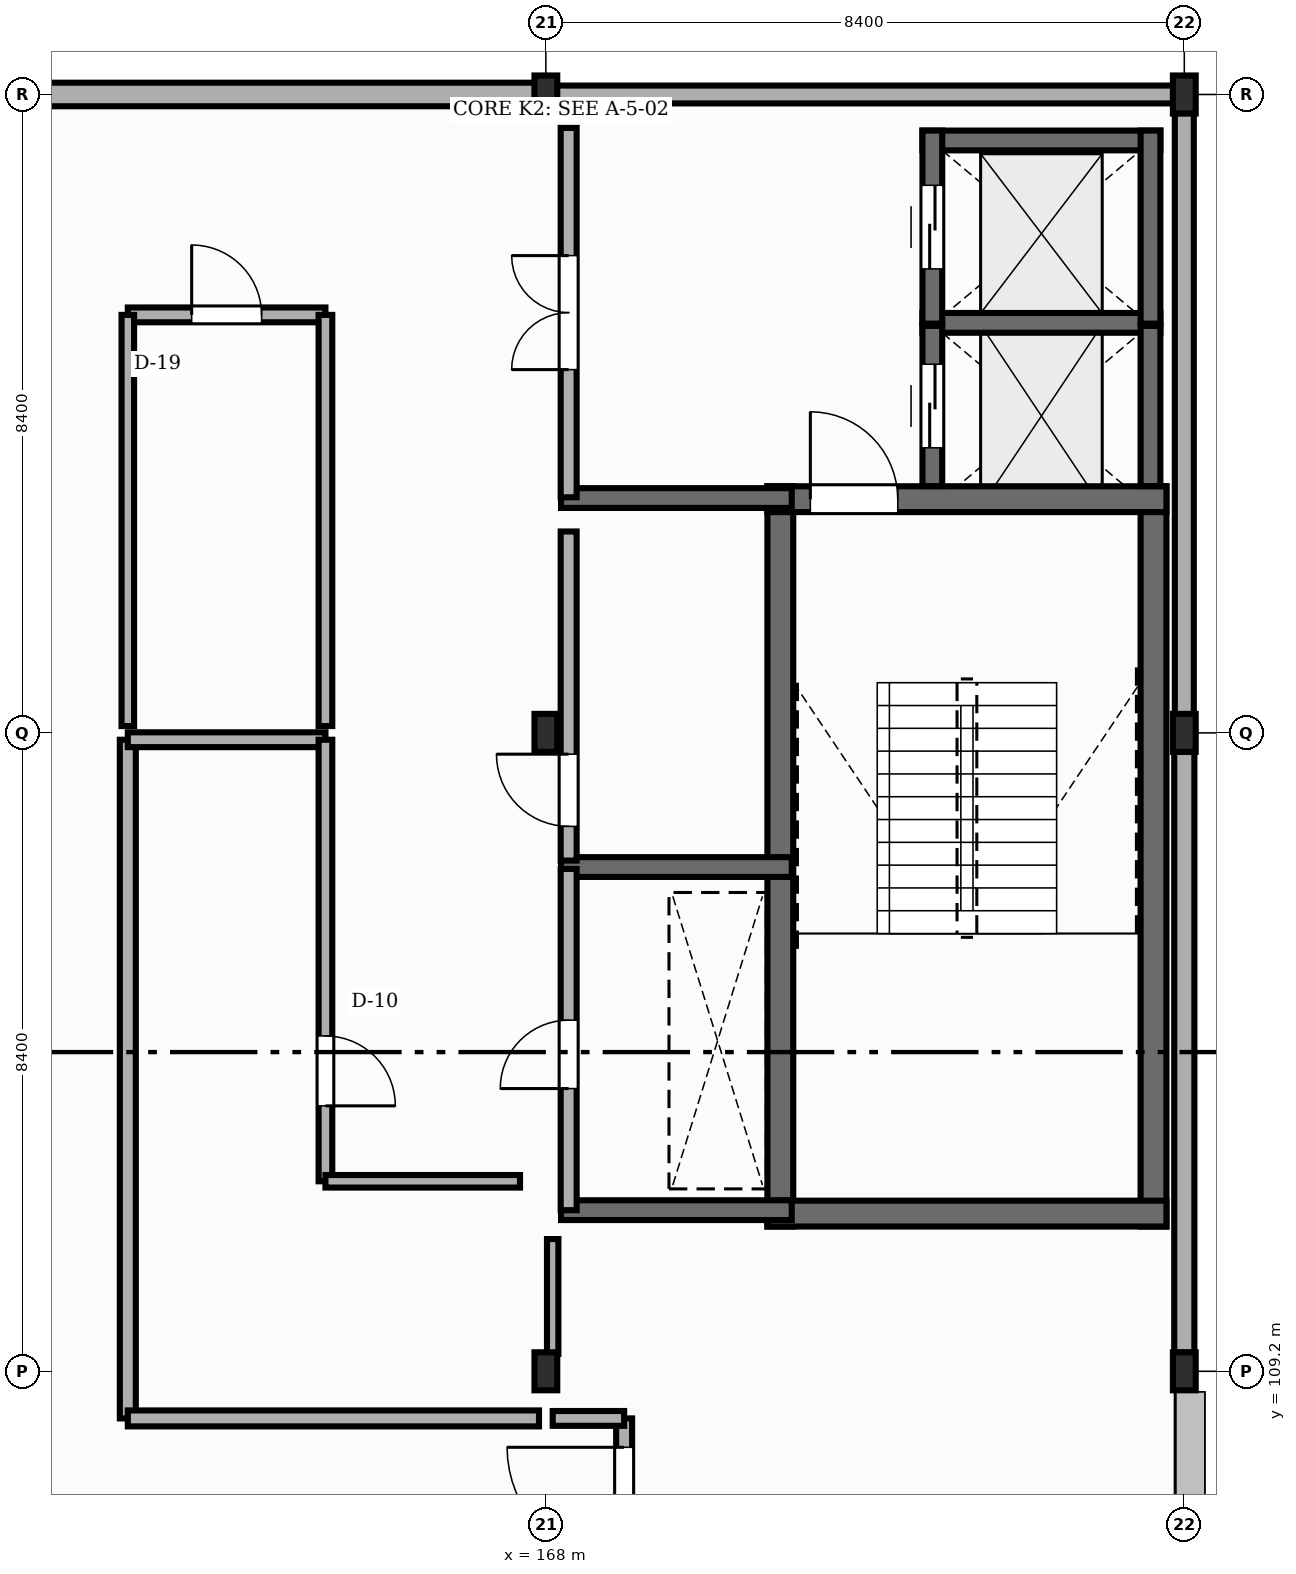
"""IFC4 building model, lengths in metres.
Left out: names, types, materials, properties, quantities, classifications, styles, units other than length and angle.
Written with IfcOpenShell. Run it as: python <this file> out.ifc"""

import sys

from ifc_helpers import new_model, si_unit, direction, frame, frame_2d, origin, origin_2d, place, context, subcontext, project, spatial, rectangle, i_section, extrude, element, fill, save


model = new_model("IFC4")
c1 = context("Model", 3, precision=1e-05, world=origin(), true_north=direction((0.0, 1.0)))
c2 = subcontext(c1, "Body", "Model", "MODEL_VIEW")
j1 = project(units=[si_unit("LENGTHUNIT", "METRE"), si_unit("PLANEANGLEUNIT", "RADIAN")], contexts=[c1])
p1 = place(None, origin())
s1 = spatial("IfcSite", under=j1, at=p1, CompositionType="ELEMENT")
p2 = place(p1, origin())
s2 = spatial("IfcBuilding", under=s1, at=p2, CompositionType="ELEMENT")
p3 = place(p2, frame((0.0, 0.0, 13.95)))
s3 = spatial("IfcBuildingStorey", under=s2, at=p3, CompositionType="ELEMENT", Elevation=13.95)
for number, where, z_axis, x_axis in (
    (1, (168.0, 109.2, 0.0), (0.0, 0.0, 1.0), (1.0, 0.0, 0.0)),
    (2, (168.0, 117.6, 0.0), (0.0, 0.0, 1.0), (1.0, 0.0, 0.0)),
    (3, (168.0, 126.0, 0.0), (0.0, 0.0, 1.0), (1.0, 0.0, 0.0)),
    (4, (176.4, 109.2, 0.0), (0.0, 0.0, 1.0), (1.0, 0.0, 0.0)),
    (5, (176.4, 117.6, 0.0), (0.0, 0.0, 1.0), (1.0, 0.0, 0.0)),
    (6, (176.4, 126.0, 0.0), (0.0, 0.0, 1.0), (1.0, 0.0, 0.0)),
):
    element("IfcColumn", number, at=place(p3, frame(where, z_axis=z_axis, x_axis=x_axis)), inside=s3, PredefinedType="COLUMN", context=c2, shape_type="SweptSolid", body=[
        extrude(i_section(OverallWidth=0.3, OverallDepth=0.5, WebThickness=0.014, FlangeThickness=0.028, FilletRadius=0.027, at=origin_2d()), origin(), (0.0, 0.0, 1.0), 4.05),
    ])
p4 = place(p3, frame((176.4, 109.446, 0.0), z_axis=(0.0, 0.0, 1.0), x_axis=(0.0, 1.0, 0.0)))
e7 = element("IfcWall", 7, at=p4, inside=s3, PredefinedType="STANDARD", context=c2, shape_type="SweptSolid", body=[
    extrude(rectangle(XDim=7.908, YDim=0.265, at=frame_2d((3.954, 0.0))), origin(), (0.0, 0.0, 1.0), 3.487),
])
p5 = place(p3, frame((176.4, 117.846, 0.0), z_axis=(0.0, 0.0, 1.0), x_axis=(0.0, 1.0, 0.0)))
e8 = element("IfcWall", 8, at=p5, inside=s3, PredefinedType="STANDARD", context=c2, shape_type="SweptSolid", body=[
    extrude(rectangle(XDim=7.908, YDim=0.25, at=frame_2d((3.954, 0.0))), origin(), (0.0, 0.0, 1.0), 3.577),
])
p6 = place(p3, frame((176.392, 126.0, 0.0), z_axis=(0.0, 0.0, 1.0), x_axis=(-1.0, 0.0, 0.0)))
e9 = element("IfcWall", 9, at=p6, inside=s3, PredefinedType="STANDARD", context=c2, shape_type="SweptSolid", body=[
    extrude(rectangle(XDim=8.384, YDim=0.235, at=frame_2d((4.192, 0.0))), origin(), (0.0, 0.0, 1.0), 3.517),
])
p7 = place(p3, frame((167.992, 126.0, 0.0), z_axis=(0.0, 0.0, 1.0), x_axis=(-1.0, 0.0, 0.0)))
e10 = element("IfcWall", 10, at=p7, inside=s3, PredefinedType="STANDARD", context=c2, shape_type="SweptSolid", body=[
    extrude(rectangle(XDim=8.384, YDim=0.31, at=frame_2d((4.192, 0.0))), origin(), (0.0, 0.0, 1.0), 3.487),
])
for number, where, z_axis, x_axis in (
    (11, (171.085, 111.105, 0.0), (0.0, 0.0, 1.0), (0.0, 1.0, 0.0)),
    (12, (175.995, 111.105, 0.0), (0.0, 0.0, 1.0), (0.0, 1.0, 0.0)),
):
    element("IfcWall", number, at=place(p3, frame(where, z_axis=z_axis, x_axis=x_axis)), inside=s3, PredefinedType="SHEAR", context=c2, shape_type="SweptSolid", body=[
        extrude(rectangle(XDim=9.74, YDim=0.34, at=frame_2d((4.87, 0.0))), origin(), (0.0, 0.0, 1.0), 3.85),
    ])
p8 = place(p3, frame((170.915, 111.275, 0.0), z_axis=(0.0, 0.0, 1.0), x_axis=(1.0, 0.0, 0.0)))
e13 = element("IfcWall", 13, at=p8, inside=s3, PredefinedType="SHEAR", context=c2, shape_type="SweptSolid", body=[
    extrude(rectangle(XDim=5.25, YDim=0.34, at=frame_2d((2.625, 0.0))), origin(), (0.0, 0.0, 1.0), 3.85),
])
p9 = place(p3, frame((170.915, 120.675, 0.0), z_axis=(0.0, 0.0, 1.0), x_axis=(1.0, 0.0, 0.0)))
e14 = element("IfcWall", 14, at=p9, inside=s3, PredefinedType="SHEAR", context=c2, shape_type="SweptSolid", body=[
    extrude(rectangle(XDim=5.25, YDim=0.34, at=frame_2d((2.625, 0.0))), origin(), (0.0, 0.0, 1.0), 3.85),
])
p10 = place(p9, frame((0.565, 0.0, 0.0)))
e15 = element("IfcOpeningElement", 15, at=p10, cuts=e14, PredefinedType="OPENING", context=c2, shape_type="SweptSolid", body=[
    extrude(rectangle(XDim=1.15, YDim=2.15, at=frame_2d((0.575, 1.075))), frame((0.0, 0.18, 0.0), z_axis=(0.0, -1.0, 0.0), x_axis=(1.0, 0.0, 0.0)), (0.0, 0.0, 1.0), 0.36),
])
p11 = place(p3, frame((172.955, 122.995, 0.0), z_axis=(0.0, 0.0, 1.0), x_axis=(1.0, 0.0, 0.0)))
e16 = element("IfcWall", 16, at=p11, inside=s3, PredefinedType="SHEAR", context=c2, shape_type="SweptSolid", body=[
    extrude(rectangle(XDim=3.13, YDim=0.26, at=frame_2d((1.565, 0.0))), origin(), (0.0, 0.0, 1.0), 3.85),
])
p12 = place(p3, frame((175.955, 120.847, 0.0), z_axis=(0.0, 0.0, 1.0), x_axis=(0.0, 1.0, 0.0)))
e17 = element("IfcWall", 17, at=p12, inside=s3, PredefinedType="SHEAR", context=c2, shape_type="SweptSolid", body=[
    extrude(rectangle(XDim=2.108, YDim=0.26, at=frame_2d((1.054, 0.0))), origin(), (0.0, 0.0, 1.0), 3.85),
])
p13 = place(p3, frame((173.085, 120.847, 0.0), z_axis=(0.0, 0.0, 1.0), x_axis=(0.0, 1.0, 0.0)))
e18 = element("IfcWall", 18, at=p13, inside=s3, PredefinedType="SHEAR", context=c2, shape_type="SweptSolid", body=[
    extrude(rectangle(XDim=2.108, YDim=0.26, at=frame_2d((1.054, 0.0))), origin(), (0.0, 0.0, 1.0), 3.85),
])
p14 = place(p13, frame((0.504, 0.0, 0.0)))
e19 = element("IfcOpeningElement", 19, at=p14, cuts=e18, PredefinedType="OPENING", context=c2, shape_type="SweptSolid", body=[
    extrude(rectangle(XDim=1.1, YDim=2.15, at=frame_2d((0.55, 1.075))), frame((0.0, 0.14, 0.0), z_axis=(0.0, -1.0, 0.0), x_axis=(1.0, 0.0, 0.0)), (0.0, 0.0, 1.0), 0.28),
])
p15 = place(p3, frame((172.955, 125.395, 0.0), z_axis=(0.0, 0.0, 1.0), x_axis=(1.0, 0.0, 0.0)))
e20 = element("IfcWall", 20, at=p15, inside=s3, PredefinedType="SHEAR", context=c2, shape_type="SweptSolid", body=[
    extrude(rectangle(XDim=3.13, YDim=0.26, at=frame_2d((1.565, 0.0))), origin(), (0.0, 0.0, 1.0), 3.85),
])
p16 = place(p3, frame((175.955, 122.985, 0.0), z_axis=(0.0, 0.0, 1.0), x_axis=(0.0, 1.0, 0.0)))
e21 = element("IfcWall", 21, at=p16, inside=s3, PredefinedType="SHEAR", context=c2, shape_type="SweptSolid", body=[
    extrude(rectangle(XDim=2.54, YDim=0.26, at=frame_2d((1.27, 0.0))), origin(), (0.0, 0.0, 1.0), 3.85),
])
p17 = place(p3, frame((173.085, 122.985, 0.0), z_axis=(0.0, 0.0, 1.0), x_axis=(0.0, 1.0, 0.0)))
e22 = element("IfcWall", 22, at=p17, inside=s3, PredefinedType="SHEAR", context=c2, shape_type="SweptSolid", body=[
    extrude(rectangle(XDim=2.54, YDim=0.26, at=frame_2d((1.27, 0.0))), origin(), (0.0, 0.0, 1.0), 3.85),
])
p18 = place(p17, frame((0.72, 0.0, 0.0)))
e23 = element("IfcOpeningElement", 23, at=p18, cuts=e22, PredefinedType="OPENING", context=c2, shape_type="SweptSolid", body=[
    extrude(rectangle(XDim=1.1, YDim=2.15, at=frame_2d((0.55, 1.075))), frame((0.0, 0.14, 0.0), z_axis=(0.0, -1.0, 0.0), x_axis=(1.0, 0.0, 0.0)), (0.0, 0.0, 1.0), 0.28),
])
for number, where, z_axis, x_axis in (
    (24, (168.2, 111.32, 0.0), (0.0, 0.0, 1.0), (1.0, 0.0, 0.0)),
    (25, (168.2, 115.835, 0.0), (0.0, 0.0, 1.0), (1.0, 0.0, 0.0)),
    (26, (168.2, 120.69, 0.0), (0.0, 0.0, 1.0), (1.0, 0.0, 0.0)),
):
    element("IfcWall", number, at=place(p3, frame(where, z_axis=z_axis, x_axis=x_axis)), inside=s3, PredefinedType="SHEAR", context=c2, shape_type="SweptSolid", body=[
        extrude(rectangle(XDim=3.035, YDim=0.26, at=frame_2d((1.518, 0.0))), origin(), (0.0, 0.0, 1.0), 3.85),
    ])
p19 = place(p3, frame((168.3, 111.32, 0.0), z_axis=(0.0, 0.0, 1.0), x_axis=(0.0, 1.0, 0.0)))
e27 = element("IfcWall", 27, at=p19, inside=s3, PredefinedType="STANDARD", context=c2, shape_type="SweptSolid", body=[
    extrude(rectangle(XDim=4.49, YDim=0.21, at=frame_2d((2.245, 0.0))), origin(), (0.0, 0.0, 1.0), 3.497),
])
p20 = place(p19, frame((1.6, 0.0, 0.0)))
e28 = element("IfcOpeningElement", 28, at=p20, cuts=e27, PredefinedType="OPENING", context=c2, shape_type="SweptSolid", body=[
    extrude(rectangle(XDim=0.9, YDim=2.1, at=frame_2d((0.45, 1.05))), frame((0.0, 0.115, 0.0), z_axis=(0.0, -1.0, 0.0), x_axis=(1.0, 0.0, 0.0)), (0.0, 0.0, 1.0), 0.23),
])
p21 = place(p3, frame((168.3, 115.92, 0.0), z_axis=(0.0, 0.0, 1.0), x_axis=(0.0, 1.0, 0.0)))
e29 = element("IfcWall", 29, at=p21, inside=s3, PredefinedType="STANDARD", context=c2, shape_type="SweptSolid", body=[
    extrude(rectangle(XDim=4.33, YDim=0.21, at=frame_2d((2.165, 0.0))), origin(), (0.0, 0.0, 1.0), 3.497),
])
p22 = place(p21, frame((0.45, 0.0, 0.0)))
e30 = element("IfcOpeningElement", 30, at=p22, cuts=e29, PredefinedType="OPENING", context=c2, shape_type="SweptSolid", body=[
    extrude(rectangle(XDim=0.95, YDim=2.15, at=frame_2d((0.475, 1.075))), frame((0.0, 0.115, 0.0), z_axis=(0.0, -1.0, 0.0), x_axis=(1.0, 0.0, 0.0)), (0.0, 0.0, 1.0), 0.23),
])
p23 = place(p3, frame((168.3, 120.7, 0.0), z_axis=(0.0, 0.0, 1.0), x_axis=(0.0, 1.0, 0.0)))
e31 = element("IfcWall", 31, at=p23, inside=s3, PredefinedType="STANDARD", context=c2, shape_type="SweptSolid", body=[
    extrude(rectangle(XDim=4.86, YDim=0.21, at=frame_2d((2.43, 0.0))), origin(), (0.0, 0.0, 1.0), 3.537),
])
p24 = place(p23, frame((1.68, 0.0, 0.0)))
e32 = element("IfcOpeningElement", 32, at=p24, cuts=e31, PredefinedType="OPENING", context=c2, shape_type="SweptSolid", body=[
    extrude(rectangle(XDim=1.5, YDim=2.2, at=frame_2d((0.75, 1.1))), frame((0.0, 0.115, 0.0), z_axis=(0.0, -1.0, 0.0), x_axis=(1.0, 0.0, 0.0)), (0.0, 0.0, 1.0), 0.23),
])
p25 = place(p3, frame((169.03, 106.3, -0.004), z_axis=(0.0, 0.0, 1.0), x_axis=(0.0, 1.0, 0.0)))
e33 = element("IfcWall", 33, at=p25, inside=s3, PredefinedType="STANDARD", context=c2, shape_type="SweptSolid", body=[
    extrude(rectangle(XDim=2.28, YDim=0.21, at=frame_2d((1.14, 0.0))), origin(), (0.0, 0.0, 1.0), 3.854),
])
p26 = place(p25, frame((0.36, 0.0, 0.0)))
e34 = element("IfcOpeningElement", 34, at=p26, cuts=e33, PredefinedType="OPENING", context=c2, shape_type="SweptSolid", body=[
    extrude(rectangle(XDim=1.54, YDim=2.22, at=frame_2d((0.77, 1.11))), frame((0.0, 0.115, 0.0), z_axis=(0.0, -1.0, 0.0), x_axis=(1.0, 0.0, 0.0)), (0.0, 0.0, 1.0), 0.23),
])
p27 = place(p3, frame((169.03, 108.58, -0.004), z_axis=(0.0, 0.0, 1.0), x_axis=(-1.0, 0.0, 0.0)))
e35 = element("IfcWall", 35, at=p27, inside=s3, PredefinedType="STANDARD", context=c2, shape_type="SweptSolid", body=[
    extrude(rectangle(XDim=0.94, YDim=0.195, at=frame_2d((0.47, 0.0))), origin(), (0.0, 0.0, 1.0), 3.854),
])
p28 = place(p3, frame((168.09, 109.429, -0.004), z_axis=(0.0, 0.0, 1.0), x_axis=(0.0, 1.0, 0.0)))
e36 = element("IfcWall", 36, at=p28, inside=s3, PredefinedType="STANDARD", context=c2, shape_type="SweptSolid", body=[
    extrude(rectangle(XDim=1.511, YDim=0.15, at=frame_2d((0.756, 0.0))), origin(), (0.0, 0.0, 1.0), 3.501),
])
p29 = place(p3, frame((162.5, 108.58, -0.004), z_axis=(0.0, 0.0, 1.0), x_axis=(0.0, 1.0, 0.0)))
e37 = element("IfcWall", 37, at=p29, inside=s3, PredefinedType="STANDARD", context=c2, shape_type="SweptSolid", body=[
    extrude(rectangle(XDim=8.93, YDim=0.21, at=frame_2d((4.465, 0.0))), origin(), (0.0, 0.0, 1.0), 3.551),
])
p30 = place(p3, frame((162.5, 117.51, -0.004), z_axis=(0.0, 0.0, 1.0), x_axis=(1.0, 0.0, 0.0)))
e38 = element("IfcWall", 38, at=p30, inside=s3, PredefinedType="STANDARD", context=c2, shape_type="SweptSolid", body=[
    extrude(rectangle(XDim=2.6, YDim=0.195, at=frame_2d((1.3, 0.0))), origin(), (0.0, 0.0, 1.0), 3.411),
])
p31 = place(p3, frame((165.1, 117.51, -0.004), z_axis=(0.0, 0.0, 1.0), x_axis=(0.0, -1.0, 0.0)))
e39 = element("IfcWall", 39, at=p31, inside=s3, PredefinedType="STANDARD", context=c2, shape_type="SweptSolid", body=[
    extrude(rectangle(XDim=5.81, YDim=0.18, at=frame_2d((2.905, 0.0))), origin(), (0.0, 0.0, 1.0), 3.581),
])
p32 = place(p31, frame((3.897, 0.0, 0.0)))
e40 = element("IfcOpeningElement", 40, at=p32, cuts=e39, PredefinedType="OPENING", context=c2, shape_type="SweptSolid", body=[
    extrude(rectangle(XDim=0.92, YDim=2.14, at=frame_2d((0.46, 1.07))), frame((0.0, 0.1, 0.0), z_axis=(0.0, -1.0, 0.0), x_axis=(1.0, 0.0, 0.0)), (0.0, 0.0, 1.0), 0.2),
])
p33 = place(p3, frame((165.1, 111.7, -0.004), z_axis=(0.0, 0.0, 1.0), x_axis=(1.0, 0.0, 0.0)))
e41 = element("IfcWall", 41, at=p33, inside=s3, PredefinedType="STANDARD", context=c2, shape_type="SweptSolid", body=[
    extrude(rectangle(XDim=2.56, YDim=0.165, at=frame_2d((1.28, 0.0))), origin(), (0.0, 0.0, 1.0), 3.854),
])
p34 = place(p3, frame((167.91, 108.58, -0.004), z_axis=(0.0, 0.0, 1.0), x_axis=(-1.0, 0.0, 0.0)))
e42 = element("IfcWall", 42, at=p34, inside=s3, PredefinedType="STANDARD", context=c2, shape_type="SweptSolid", body=[
    extrude(rectangle(XDim=5.41, YDim=0.21, at=frame_2d((2.705, 0.0))), origin(), (0.0, 0.0, 1.0), 3.854),
])
p35 = place(p3, frame((162.5, 123.1, -0.004), z_axis=(0.0, 0.0, 1.0), x_axis=(1.0, 0.0, 0.0)))
e43 = element("IfcWall", 43, at=p35, inside=s3, PredefinedType="STANDARD", context=c2, shape_type="SweptSolid", body=[
    extrude(rectangle(XDim=2.6, YDim=0.195, at=frame_2d((1.3, 0.0))), origin(), (0.0, 0.0, 1.0), 3.854),
])
p36 = place(p35, frame((0.84, 0.0, 0.0)))
e44 = element("IfcOpeningElement", 44, at=p36, cuts=e43, PredefinedType="OPENING", context=c2, shape_type="SweptSolid", body=[
    extrude(rectangle(XDim=0.92, YDim=2.22, at=frame_2d((0.46, 1.11))), frame((0.0, 0.107, 0.0), z_axis=(0.0, -1.0, 0.0), x_axis=(1.0, 0.0, 0.0)), (0.0, 0.0, 1.0), 0.215),
])
p37 = place(p3, frame((165.1, 123.1, -0.004), z_axis=(0.0, 0.0, 1.0), x_axis=(0.0, -1.0, 0.0)))
e45 = element("IfcWall", 45, at=p37, inside=s3, PredefinedType="STANDARD", context=c2, shape_type="SweptSolid", body=[
    extrude(rectangle(XDim=5.41, YDim=0.18, at=frame_2d((2.705, 0.0))), origin(), (0.0, 0.0, 1.0), 3.611),
])
p38 = place(p3, frame((162.5, 117.69, -0.004), z_axis=(0.0, 0.0, 1.0), x_axis=(0.0, 1.0, 0.0)))
e46 = element("IfcWall", 46, at=p38, inside=s3, PredefinedType="STANDARD", context=c2, shape_type="SweptSolid", body=[
    extrude(rectangle(XDim=5.41, YDim=0.165, at=frame_2d((2.705, 0.0))), origin(), (0.0, 0.0, 1.0), 3.611),
])
p39 = place(p10, origin())
e47 = element("IfcDoor", 47, at=p39, inside=s3, OperationType="SINGLE_SWING_LEFT", PredefinedType="DOOR", context=c2, shape_type="SweptSolid", body=[
    extrude(rectangle(XDim=1.15, YDim=2.15, at=frame_2d((0.575, 1.075))), frame((0.0, 0.025, 0.0), z_axis=(0.0, -1.0, 0.0), x_axis=(1.0, 0.0, 0.0)), (0.0, 0.0, 1.0), 0.05),
])
fill(e15, e47)
p40 = place(p14, origin())
e48 = element("IfcDoor", 48, at=p40, inside=s3, OperationType="DOUBLE_DOOR_SLIDING", PredefinedType="DOOR", context=c2, shape_type="SweptSolid", body=[
    extrude(rectangle(XDim=1.1, YDim=2.15, at=frame_2d((0.55, 1.075))), frame((0.0, 0.025, 0.0), z_axis=(0.0, -1.0, 0.0), x_axis=(1.0, 0.0, 0.0)), (0.0, 0.0, 1.0), 0.05),
])
fill(e19, e48)
p41 = place(p18, origin())
e49 = element("IfcDoor", 49, at=p41, inside=s3, OperationType="DOUBLE_DOOR_SLIDING", PredefinedType="DOOR", context=c2, shape_type="SweptSolid", body=[
    extrude(rectangle(XDim=1.1, YDim=2.15, at=frame_2d((0.55, 1.075))), frame((0.0, 0.025, 0.0), z_axis=(0.0, -1.0, 0.0), x_axis=(1.0, 0.0, 0.0)), (0.0, 0.0, 1.0), 0.05),
])
fill(e23, e49)
p42 = place(p20, origin())
e50 = element("IfcDoor", 50, at=p42, inside=s3, OperationType="SINGLE_SWING_LEFT", PredefinedType="DOOR", context=c2, shape_type="SweptSolid", body=[
    extrude(rectangle(XDim=0.9, YDim=2.1, at=frame_2d((0.45, 1.05))), frame((0.0, 0.025, 0.0), z_axis=(0.0, -1.0, 0.0), x_axis=(1.0, 0.0, 0.0)), (0.0, 0.0, 1.0), 0.05),
])
fill(e28, e50)
p43 = place(p22, origin())
e51 = element("IfcDoor", 51, at=p43, inside=s3, OperationType="SINGLE_SWING_RIGHT", PredefinedType="DOOR", context=c2, shape_type="SweptSolid", body=[
    extrude(rectangle(XDim=0.95, YDim=2.15, at=frame_2d((0.475, 1.075))), frame((0.0, 0.025, 0.0), z_axis=(0.0, -1.0, 0.0), x_axis=(1.0, 0.0, 0.0)), (0.0, 0.0, 1.0), 0.05),
])
fill(e30, e51)
p44 = place(p24, origin())
e52 = element("IfcDoor", 52, at=p44, inside=s3, OperationType="DOUBLE_DOOR_SINGLE_SWING", PredefinedType="DOOR", context=c2, shape_type="SweptSolid", body=[
    extrude(rectangle(XDim=1.5, YDim=2.2, at=frame_2d((0.75, 1.1))), frame((0.0, 0.025, 0.0), z_axis=(0.0, -1.0, 0.0), x_axis=(1.0, 0.0, 0.0)), (0.0, 0.0, 1.0), 0.05),
])
fill(e32, e52)
p45 = place(p26, origin())
e53 = element("IfcDoor", 53, at=p45, inside=s3, OperationType="SINGLE_SWING_RIGHT", PredefinedType="DOOR", context=c2, shape_type="SweptSolid", body=[
    extrude(rectangle(XDim=1.54, YDim=2.22, at=frame_2d((0.77, 1.11))), frame((0.0, 0.025, 0.0), z_axis=(0.0, -1.0, 0.0), x_axis=(1.0, 0.0, 0.0)), (0.0, 0.0, 1.0), 0.05),
])
fill(e34, e53)
p46 = place(p32, origin())
e54 = element("IfcDoor", 54, at=p46, inside=s3, OperationType="SINGLE_SWING_RIGHT", PredefinedType="DOOR", context=c2, shape_type="SweptSolid", body=[
    extrude(rectangle(XDim=0.92, YDim=2.14, at=frame_2d((0.46, 1.07))), frame((0.0, 0.025, 0.0), z_axis=(0.0, -1.0, 0.0), x_axis=(1.0, 0.0, 0.0)), (0.0, 0.0, 1.0), 0.05),
])
fill(e40, e54)
p47 = place(p36, origin())
e55 = element("IfcDoor", 55, at=p47, inside=s3, OperationType="SINGLE_SWING_LEFT", PredefinedType="DOOR", context=c2, shape_type="SweptSolid", body=[
    extrude(rectangle(XDim=0.92, YDim=2.22, at=frame_2d((0.46, 1.11))), frame((0.0, 0.025, 0.0), z_axis=(0.0, -1.0, 0.0), x_axis=(1.0, 0.0, 0.0)), (0.0, 0.0, 1.0), 0.05),
])
fill(e44, e55)
save(model, sys.argv[1])
